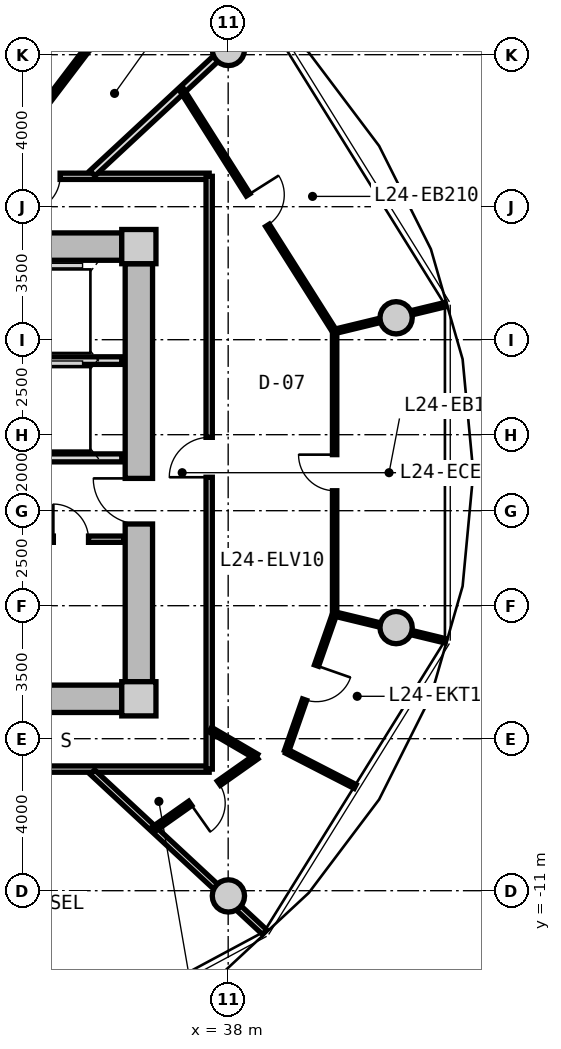
"""IFC4 building model, lengths in metres.
Left out: names, types, materials, properties, quantities, classifications, styles, units other than length and angle.
Written with IfcOpenShell. Run it as: python <this file> out.ifc"""

import sys

from ifc_helpers import new_model, si_unit, direction, frame, frame_2d, origin, origin_2d, place, context, subcontext, project, spatial, rectangle, circle, extrude, source, transform, mapped, element, fill, save


model = new_model("IFC4")
c1 = context("Model", 3, precision=1e-05, world=origin(), true_north=direction((0.0, 1.0)))
c2 = subcontext(c1, "Body", "Model", "MODEL_VIEW")
j1 = project(units=[si_unit("LENGTHUNIT", "METRE"), si_unit("PLANEANGLEUNIT", "RADIAN")], contexts=[c1])
p1 = place(None, origin())
s1 = spatial("IfcSite", under=j1, at=p1, CompositionType="ELEMENT")
p2 = place(p1, origin())
s2 = spatial("IfcBuilding", under=s1, at=p2, CompositionType="ELEMENT")
p3 = place(p2, frame((0.0, 0.0, 81.0)))
s3 = spatial("IfcBuildingStorey", under=s2, at=p3, CompositionType="ELEMENT", Elevation=81.0)
m1 = source(origin(), c2, "Body", "SweptSolid", [
    extrude(rectangle(XDim=0.9, YDim=0.9, at=origin_2d()), origin(), (0.0, 0.0, 1.0), 3.05),
])
for number, where, z_axis, x_axis in (
    (1, (35.65, -5.95, 0.0), (0.0, 0.0, 1.0), (1.0, 0.0, 0.0)),
    (2, (35.65, 5.95, 0.0), (0.0, 0.0, 1.0), (1.0, 0.0, 0.0)),
):
    element("IfcColumn", number, at=place(p3, frame(where, z_axis=z_axis, x_axis=x_axis)), inside=s3, PredefinedType="COLUMN", context=c2, shape_type="MappedRepresentation", body=[
        mapped(m1, transform((0.0, 0.0, 0.0), x_axis=(1.0, 0.0, 0.0), y_axis=(0.0, 1.0, 0.0), z_axis=(0.0, 0.0, 1.0), scale=1.0)),
    ])
m2 = source(origin(), c2, "Body", "SweptSolid", [
    extrude(rectangle(XDim=14.4, YDim=0.72, at=frame_2d((7.2, 0.0))), origin(), (0.0, 0.0, 1.0), 2.79),
])
for number, where, z_axis, x_axis in (
    (3, (20.8, 5.95, 0.0), (0.0, 0.0, 1.0), (1.0, 0.0, 0.0)),
    (4, (35.2, -5.95, 0.0), (0.0, 0.0, 1.0), (-1.0, 0.0, 0.0)),
):
    element("IfcWall", number, at=place(p3, frame(where, z_axis=z_axis, x_axis=x_axis)), inside=s3, PredefinedType="SHEAR", context=c2, shape_type="MappedRepresentation", body=[
        mapped(m2, transform((0.0, 0.0, 0.0), x_axis=(1.0, 0.0, 0.0), y_axis=(0.0, 1.0, 0.0), z_axis=(0.0, 0.0, 1.0), scale=1.0)),
    ])
m3 = source(origin(), c2, "Body", "SweptSolid", [
    extrude(rectangle(XDim=11.0, YDim=0.72, at=frame_2d((5.5, 0.0))), origin(), (0.0, 0.0, 1.0), 2.79),
])
p4 = place(p3, frame((35.65, 5.5, 0.0), z_axis=(0.0, 0.0, 1.0), x_axis=(0.0, -1.0, 0.0)))
e5 = element("IfcWall", 5, at=p4, inside=s3, PredefinedType="SHEAR", context=c2, shape_type="MappedRepresentation", body=[
    mapped(m3, transform((0.0, 0.0, 0.0), x_axis=(1.0, 0.0, 0.0), y_axis=(0.0, 1.0, 0.0), z_axis=(0.0, 0.0, 1.0), scale=1.0)),
])
p5 = place(p4, frame((5.65, 0.0, 0.0)))
e6 = element("IfcOpeningElement", 6, at=p5, cuts=e5, PredefinedType="OPENING", context=c2, shape_type="SweptSolid", body=[
    extrude(rectangle(XDim=1.2, YDim=2.15, at=frame_2d((0.6, 1.075))), frame((0.0, 0.37, 0.0), z_axis=(0.0, -1.0, 0.0), x_axis=(1.0, 0.0, 0.0)), (0.0, 0.0, 1.0), 0.74),
])
m4 = source(origin(), c2, "Body", "SweptSolid", [
    extrude(circle(Radius=0.425, at=origin_2d()), origin(), (0.0, 0.0, 1.0), 3.05),
])
for number, where, z_axis, x_axis in (
    (7, (42.419, 4.076, 0.0), (0.0, 0.0, 1.0), (1.0, 0.0, 0.0)),
    (8, (38.006, 11.137, 0.0), (0.0, 0.0, 1.0), (1.0, 0.0, 0.0)),
    (9, (38.006, -11.137, 0.0), (0.0, 0.0, 1.0), (1.0, 0.0, 0.0)),
    (10, (42.419, -4.076, 0.0), (0.0, 0.0, 1.0), (1.0, 0.0, 0.0)),
):
    element("IfcColumn", number, at=place(p3, frame(where, z_axis=z_axis, x_axis=x_axis)), inside=s3, PredefinedType="COLUMN", context=c2, shape_type="MappedRepresentation", body=[
        mapped(m4, transform((0.0, 0.0, 0.0), x_axis=(1.0, 0.0, 0.0), y_axis=(0.0, 1.0, 0.0), z_axis=(0.0, 0.0, 1.0), scale=1.0)),
    ])
m5 = source(origin(), c2, "Body", "SweptSolid", [
    extrude(rectangle(XDim=3.2, YDim=0.2, at=frame_2d((1.6, 0.0))), origin(), (0.0, 0.0, 1.0), 2.775),
])
p6 = place(p3, frame((32.0, 2.95, 0.0), z_axis=(0.0, 0.0, 1.0), x_axis=(1.0, 0.0, 0.0)))
e11 = element("IfcWall", 11, at=p6, inside=s3, PredefinedType="PARTITIONING", context=c2, shape_type="MappedRepresentation", body=[
    mapped(m5, transform((0.0, 0.0, 0.0), x_axis=(1.0, 0.0, 0.0), y_axis=(0.0, 1.0, 0.0), z_axis=(0.0, 0.0, 1.0), scale=1.0)),
])
m6 = source(origin(), c2, "Body", "SweptSolid", [
    extrude(rectangle(XDim=6.66, YDim=0.21, at=frame_2d((3.33, 0.0))), origin(), (0.0, 0.0, 1.0), 2.775),
])
p7 = place(p3, frame((28.54, 0.39, 0.0), z_axis=(0.0, 0.0, 1.0), x_axis=(1.0, 0.0, 0.0)))
e12 = element("IfcWall", 12, at=p7, inside=s3, PredefinedType="PARTITIONING", context=c2, shape_type="MappedRepresentation", body=[
    mapped(m6, transform((0.0, 0.0, 0.0), x_axis=(1.0, 0.0, 0.0), y_axis=(0.0, 1.0, 0.0), z_axis=(0.0, 0.0, 1.0), scale=1.0)),
])
p8 = place(p7, frame((1.0, 0.0, 0.0)))
e13 = element("IfcOpeningElement", 13, at=p8, cuts=e12, PredefinedType="OPENING", context=c2, shape_type="SweptSolid", body=[
    extrude(rectangle(XDim=1.2, YDim=2.15, at=frame_2d((0.6, 1.075))), frame((0.0, 0.115, 0.0), z_axis=(0.0, -1.0, 0.0), x_axis=(1.0, 0.0, 0.0)), (0.0, 0.0, 1.0), 0.23),
])
m7 = source(origin(), c2, "Body", "SweptSolid", [
    extrude(rectangle(XDim=2.7, YDim=0.165, at=frame_2d((1.35, 0.0))), origin(), (0.0, 0.0, 1.0), 2.775),
])
p9 = place(p3, frame((32.55, -1.75, 0.0), z_axis=(0.0, 0.0, 1.0), x_axis=(1.0, 0.0, 0.0)))
e14 = element("IfcWall", 14, at=p9, inside=s3, PredefinedType="PARTITIONING", context=c2, shape_type="MappedRepresentation", body=[
    mapped(m7, transform((0.0, 0.0, 0.0), x_axis=(1.0, 0.0, 0.0), y_axis=(0.0, 1.0, 0.0), z_axis=(0.0, 0.0, 1.0), scale=1.0)),
])
p10 = place(p9, frame((0.85, 0.0, 0.0)))
e15 = element("IfcOpeningElement", 15, at=p10, cuts=e14, PredefinedType="OPENING", context=c2, shape_type="SweptSolid", body=[
    extrude(rectangle(XDim=0.925, YDim=2.1, at=frame_2d((0.462, 1.05))), frame((0.0, 0.093, 0.0), z_axis=(0.0, -1.0, 0.0), x_axis=(1.0, 0.0, 0.0)), (0.0, 0.0, 1.0), 0.185),
])
m8 = source(origin(), c2, "Body", "SweptSolid", [
    extrude(rectangle(XDim=9.234, YDim=0.165, at=frame_2d((4.617, 0.0))), origin(), (0.0, 0.0, 1.0), 2.775),
])
p11 = place(p3, frame((28.266, 7.8, 0.0), z_axis=(0.0, 0.0, 1.0), x_axis=(1.0, 0.0, 0.0)))
e16 = element("IfcWall", 16, at=p11, inside=s3, PredefinedType="PARTITIONING", context=c2, shape_type="MappedRepresentation", body=[
    mapped(m8, transform((0.0, 0.0, 0.0), x_axis=(1.0, 0.0, 0.0), y_axis=(0.0, 1.0, 0.0), z_axis=(0.0, 0.0, 1.0), scale=1.0)),
])
p12 = place(p11, frame((4.392, 0.0, 0.0)))
e17 = element("IfcOpeningElement", 17, at=p12, cuts=e16, PredefinedType="OPENING", context=c2, shape_type="SweptSolid", body=[
    extrude(rectangle(XDim=0.92, YDim=2.1, at=frame_2d((0.46, 1.05))), frame((0.0, 0.093, 0.0), z_axis=(0.0, -1.0, 0.0), x_axis=(1.0, 0.0, 0.0)), (0.0, 0.0, 1.0), 0.185),
])
p13 = place(p11, frame((1.408, 0.0, 0.0)))
e18 = element("IfcOpeningElement", 18, at=p13, cuts=e16, PredefinedType="OPENING", context=c2, shape_type="SweptSolid", body=[
    extrude(rectangle(XDim=0.92, YDim=2.1, at=frame_2d((0.46, 1.05))), frame((0.0, 0.093, 0.0), z_axis=(0.0, -1.0, 0.0), x_axis=(1.0, 0.0, 0.0)), (0.0, 0.0, 1.0), 0.185),
])
m9 = source(origin(), c2, "Body", "SweptSolid", [
    extrude(rectangle(XDim=8.6, YDim=0.165, at=frame_2d((4.3, 0.0))), origin(), (0.0, 0.0, 1.0), 2.775),
])
p14 = place(p3, frame((37.5, -7.8, 0.0), z_axis=(0.0, 0.0, 1.0), x_axis=(-1.0, 0.0, 0.0)))
e19 = element("IfcWall", 19, at=p14, inside=s3, PredefinedType="PARTITIONING", context=c2, shape_type="MappedRepresentation", body=[
    mapped(m9, transform((0.0, 0.0, 0.0), x_axis=(1.0, 0.0, 0.0), y_axis=(0.0, 1.0, 0.0), z_axis=(0.0, 0.0, 1.0), scale=1.0)),
])
m10 = source(origin(), c2, "Body", "SweptSolid", [
    extrude(rectangle(XDim=15.6, YDim=0.165, at=frame_2d((7.8, 0.0))), origin(), (0.0, 0.0, 1.0), 2.775),
])
p15 = place(p3, frame((37.5, 7.8, 0.0), z_axis=(0.0, 0.0, 1.0), x_axis=(0.0, -1.0, 0.0)))
e20 = element("IfcWall", 20, at=p15, inside=s3, PredefinedType="PARTITIONING", context=c2, shape_type="MappedRepresentation", body=[
    mapped(m10, transform((0.0, 0.0, 0.0), x_axis=(1.0, 0.0, 0.0), y_axis=(0.0, 1.0, 0.0), z_axis=(0.0, 0.0, 1.0), scale=1.0)),
])
p16 = place(p15, frame((6.87, 0.0, 0.0)))
e21 = element("IfcOpeningElement", 21, at=p16, cuts=e20, PredefinedType="OPENING", context=c2, shape_type="SweptSolid", body=[
    extrude(rectangle(XDim=1.05, YDim=2.15, at=frame_2d((0.525, 1.075))), frame((0.0, 0.093, 0.0), z_axis=(0.0, -1.0, 0.0), x_axis=(1.0, 0.0, 0.0)), (0.0, 0.0, 1.0), 0.185),
])
m11 = source(origin(), c2, "Body", "SweptSolid", [
    extrude(rectangle(XDim=6.187, YDim=0.165, at=frame_2d((3.093, 0.0))), origin(), (0.0, 0.0, 1.0), 2.275),
])
p17 = place(p3, frame((34.429, -7.88, 0.0), z_axis=(0.0, 0.0, 1.0), x_axis=(0.732501077882, -0.680765870841, 0.0)))
e22 = element("IfcWall", 22, at=p17, inside=s3, PredefinedType="PARTITIONING", context=c2, shape_type="MappedRepresentation", body=[
    mapped(m11, transform((0.0, 0.0, 0.0), x_axis=(1.0, 0.0, 0.0), y_axis=(0.0, 1.0, 0.0), z_axis=(0.0, 0.0, 1.0), scale=1.0)),
])
m12 = source(origin(), c2, "Body", "SweptSolid", [
    extrude(rectangle(XDim=6.187, YDim=0.19, at=frame_2d((3.093, 0.0))), origin(), (0.0, 0.0, 1.0), 2.275),
])
p18 = place(p3, frame((34.429, 7.88, 0.0), z_axis=(0.0, 0.0, 1.0), x_axis=(0.732501077882, 0.680765870841, 0.0)))
e23 = element("IfcWall", 23, at=p18, inside=s3, PredefinedType="PARTITIONING", context=c2, shape_type="MappedRepresentation", body=[
    mapped(m12, transform((0.0, 0.0, 0.0), x_axis=(1.0, 0.0, 0.0), y_axis=(0.0, 1.0, 0.0), z_axis=(0.0, 0.0, 1.0), scale=1.0)),
])
m13 = source(origin(), c2, "Body", "SweptSolid", [
    extrude(rectangle(XDim=7.438, YDim=0.115, at=frame_2d((3.719, 0.0))), origin(), (0.0, 0.0, 1.0), 2.775),
])
p19 = place(p3, frame((40.801, -3.719, 0.0), z_axis=(0.0, 0.0, 1.0), x_axis=(0.0, 1.0, 0.0)))
e24 = element("IfcWall", 24, at=p19, inside=s3, PredefinedType="PARTITIONING", context=c2, shape_type="MappedRepresentation", body=[
    mapped(m13, transform((0.0, 0.0, 0.0), x_axis=(1.0, 0.0, 0.0), y_axis=(0.0, 1.0, 0.0), z_axis=(0.0, 0.0, 1.0), scale=1.0)),
])
p20 = place(p19, frame((3.244, 0.0, 0.0)))
e25 = element("IfcOpeningElement", 25, at=p20, cuts=e24, PredefinedType="OPENING", context=c2, shape_type="SweptSolid", body=[
    extrude(rectangle(XDim=0.95, YDim=2.1, at=frame_2d((0.475, 1.05))), frame((0.0, 0.067, 0.0), z_axis=(0.0, -1.0, 0.0), x_axis=(1.0, 0.0, 0.0)), (0.0, 0.0, 1.0), 0.135),
])
m14 = source(origin(), c2, "Body", "SweptSolid", [
    extrude(rectangle(XDim=3.006, YDim=0.115, at=frame_2d((1.503, 0.0))), origin(), (0.0, 0.0, 1.0), 2.275),
])
p21 = place(p3, frame((40.801, -3.719, 0.0), z_axis=(0.0, 0.0, 1.0), x_axis=(0.971949193017, -0.235190914353, 0.0)))
e26 = element("IfcWall", 26, at=p21, inside=s3, PredefinedType="PARTITIONING", context=c2, shape_type="MappedRepresentation", body=[
    mapped(m14, transform((0.0, 0.0, 0.0), x_axis=(1.0, 0.0, 0.0), y_axis=(0.0, 1.0, 0.0), z_axis=(0.0, 0.0, 1.0), scale=1.0)),
])
m15 = source(origin(), c2, "Body", "SweptSolid", [
    extrude(rectangle(XDim=7.555, YDim=0.115, at=frame_2d((3.777, 0.0))), origin(), (0.0, 0.0, 1.0), 2.775),
])
p22 = place(p3, frame((40.8, 3.718, 0.0), z_axis=(0.0, 0.0, 1.0), x_axis=(-0.534546095992, 0.845139320621, 0.0)))
e27 = element("IfcWall", 27, at=p22, inside=s3, PredefinedType="PARTITIONING", context=c2, shape_type="MappedRepresentation", body=[
    mapped(m15, transform((0.0, 0.0, 0.0), x_axis=(1.0, 0.0, 0.0), y_axis=(0.0, 1.0, 0.0), z_axis=(0.0, 0.0, 1.0), scale=1.0)),
])
p23 = place(p22, frame((3.302, 0.0, 0.0)))
e28 = element("IfcOpeningElement", 28, at=p23, cuts=e27, PredefinedType="OPENING", context=c2, shape_type="SweptSolid", body=[
    extrude(rectangle(XDim=0.95, YDim=2.1, at=frame_2d((0.475, 1.05))), frame((0.0, 0.067, 0.0), z_axis=(0.0, -1.0, 0.0), x_axis=(1.0, 0.0, 0.0)), (0.0, 0.0, 1.0), 0.135),
])
m16 = source(origin(), c2, "Body", "SweptSolid", [
    extrude(rectangle(XDim=3.008, YDim=0.115, at=frame_2d((1.504, 0.0))), origin(), (0.0, 0.0, 1.0), 2.275),
])
p24 = place(p3, frame((40.8, 3.718, 0.0), z_axis=(0.0, 0.0, 1.0), x_axis=(0.971939021518, 0.235232945078, 0.0)))
e29 = element("IfcWall", 29, at=p24, inside=s3, PredefinedType="PARTITIONING", context=c2, shape_type="MappedRepresentation", body=[
    mapped(m16, transform((0.0, 0.0, 0.0), x_axis=(1.0, 0.0, 0.0), y_axis=(0.0, 1.0, 0.0), z_axis=(0.0, 0.0, 1.0), scale=1.0)),
])
m17 = source(origin(), c2, "Body", "SweptSolid", [
    extrude(rectangle(XDim=1.407, YDim=0.14, at=frame_2d((0.704, 0.0))), origin(), (0.0, 0.0, 1.0), 2.775),
])
p25 = place(p3, frame((37.53, -6.762, 0.0), z_axis=(0.0, 0.0, 1.0), x_axis=(0.863539718977, -0.504280828258, 0.0)))
e30 = element("IfcWall", 30, at=p25, inside=s3, PredefinedType="PARTITIONING", context=c2, shape_type="MappedRepresentation", body=[
    mapped(m17, transform((0.0, 0.0, 0.0), x_axis=(1.0, 0.0, 0.0), y_axis=(0.0, 1.0, 0.0), z_axis=(0.0, 0.0, 1.0), scale=1.0)),
])
m18 = source(origin(), c2, "Body", "SweptSolid", [
    extrude(rectangle(XDim=3.347, YDim=0.14, at=frame_2d((1.673, 0.0))), origin(), (0.0, 0.0, 1.0), 2.775),
])
p26 = place(p3, frame((38.745, -7.472, 0.0), z_axis=(0.0, 0.0, 1.0), x_axis=(-0.81705680263, -0.576557179537, 0.0)))
e31 = element("IfcWall", 31, at=p26, inside=s3, PredefinedType="PARTITIONING", context=c2, shape_type="MappedRepresentation", body=[
    mapped(m18, transform((0.0, 0.0, 0.0), x_axis=(1.0, 0.0, 0.0), y_axis=(0.0, 1.0, 0.0), z_axis=(0.0, 0.0, 1.0), scale=1.0)),
])
p27 = place(p26, frame((1.214, 0.0, 0.0)))
e32 = element("IfcOpeningElement", 32, at=p27, cuts=e31, PredefinedType="OPENING", context=c2, shape_type="SweptSolid", body=[
    extrude(rectangle(XDim=0.92, YDim=2.1, at=frame_2d((0.46, 1.05))), frame((0.0, 0.08, 0.0), z_axis=(0.0, -1.0, 0.0), x_axis=(1.0, 0.0, 0.0)), (0.0, 0.0, 1.0), 0.16),
])
m19 = source(origin(), c2, "Body", "SweptSolid", [
    extrude(rectangle(XDim=2.031, YDim=0.115, at=frame_2d((1.016, 0.0))), origin(), (0.0, 0.0, 1.0), 2.775),
])
p28 = place(p3, frame((39.535, -7.33, 0.0), z_axis=(0.0, 0.0, 1.0), x_axis=(0.889297578836, -0.457329002226, 0.0)))
e33 = element("IfcWall", 33, at=p28, inside=s3, PredefinedType="PARTITIONING", context=c2, shape_type="MappedRepresentation", body=[
    mapped(m19, transform((0.0, 0.0, 0.0), x_axis=(1.0, 0.0, 0.0), y_axis=(0.0, 1.0, 0.0), z_axis=(0.0, 0.0, 1.0), scale=1.0)),
])
m20 = source(origin(), c2, "Body", "SweptSolid", [
    extrude(rectangle(XDim=3.826, YDim=0.115, at=frame_2d((1.913, 0.0))), origin(), (0.0, 0.0, 1.0), 2.775),
])
p29 = place(p3, frame((39.535, -7.33, 0.0), z_axis=(0.0, 0.0, 1.0), x_axis=(0.330452740212, 0.943822539721, 0.0)))
e34 = element("IfcWall", 34, at=p29, inside=s3, PredefinedType="PARTITIONING", context=c2, shape_type="MappedRepresentation", body=[
    mapped(m20, transform((0.0, 0.0, 0.0), x_axis=(1.0, 0.0, 0.0), y_axis=(0.0, 1.0, 0.0), z_axis=(0.0, 0.0, 1.0), scale=1.0)),
])
p30 = place(p29, frame((1.438, 0.0, 0.0)))
e35 = element("IfcOpeningElement", 35, at=p30, cuts=e34, PredefinedType="OPENING", context=c2, shape_type="SweptSolid", body=[
    extrude(rectangle(XDim=0.95, YDim=2.1, at=frame_2d((0.475, 1.05))), frame((0.0, 0.067, 0.0), z_axis=(0.0, -1.0, 0.0), x_axis=(1.0, 0.0, 0.0)), (0.0, 0.0, 1.0), 0.135),
])
m21 = source(origin(), c2, "Body", "SweptSolid", [
    extrude(rectangle(XDim=7.243, YDim=0.14, at=frame_2d((3.621, 0.0))), origin(), (0.0, 0.0, 1.0), 2.775),
])
p31 = place(p3, frame((31.774, 7.83, 0.0), z_axis=(0.0, 0.0, 1.0), x_axis=(0.605111472002, 0.796140757939, 0.0)))
e36 = element("IfcWall", 36, at=p31, inside=s3, PredefinedType="PARTITIONING", context=c2, shape_type="MappedRepresentation", body=[
    mapped(m21, transform((0.0, 0.0, 0.0), x_axis=(1.0, 0.0, 0.0), y_axis=(0.0, 1.0, 0.0), z_axis=(0.0, 0.0, 1.0), scale=1.0)),
])
m22 = source(origin(), c2, "Body", "SweptSolid", [
    extrude(rectangle(XDim=1.2, YDim=2.15, at=frame_2d((0.6, 1.075))), frame((0.0, 0.025, 0.0), z_axis=(0.0, -1.0, 0.0), x_axis=(1.0, 0.0, 0.0)), (0.0, 0.0, 1.0), 0.05),
])
p32 = place(p5, frame((1.2, 0.0, 0.0), z_axis=(0.0, 0.0, 1.0), x_axis=(-1.0, 0.0, 0.0)))
e37 = element("IfcDoor", 37, at=p32, inside=s3, OperationType="SINGLE_SWING_RIGHT", PredefinedType="DOOR", context=c2, shape_type="MappedRepresentation", body=[
    mapped(m22, transform((0.0, 0.0, 0.0), x_axis=(1.0, 0.0, 0.0), y_axis=(0.0, 1.0, 0.0), z_axis=(0.0, 0.0, 1.0), scale=1.0)),
])
fill(e6, e37)
m23 = source(origin(), c2, "Body", "SweptSolid", [
    extrude(rectangle(XDim=0.925, YDim=2.1, at=frame_2d((0.462, 1.05))), frame((0.0, 0.025, 0.0), z_axis=(0.0, -1.0, 0.0), x_axis=(1.0, 0.0, 0.0)), (0.0, 0.0, 1.0), 0.05),
])
p33 = place(p10, origin())
e38 = element("IfcDoor", 38, at=p33, inside=s3, OperationType="SINGLE_SWING_LEFT", PredefinedType="DOOR", context=c2, shape_type="MappedRepresentation", body=[
    mapped(m23, transform((0.0, 0.0, 0.0), x_axis=(1.0, 0.0, 0.0), y_axis=(0.0, 1.0, 0.0), z_axis=(0.0, 0.0, 1.0), scale=1.0)),
])
fill(e15, e38)
m24 = source(origin(), c2, "Body", "SweptSolid", [
    extrude(rectangle(XDim=1.05, YDim=2.15, at=frame_2d((0.525, 1.075))), frame((0.0, 0.025, 0.0), z_axis=(0.0, -1.0, 0.0), x_axis=(1.0, 0.0, 0.0)), (0.0, 0.0, 1.0), 0.05),
])
p34 = place(p16, frame((1.05, 0.0, 0.0), z_axis=(0.0, 0.0, 1.0), x_axis=(-1.0, 0.0, 0.0)))
e39 = element("IfcDoor", 39, at=p34, inside=s3, OperationType="SINGLE_SWING_LEFT", PredefinedType="DOOR", context=c2, shape_type="MappedRepresentation", body=[
    mapped(m24, transform((0.0, 0.0, 0.0), x_axis=(1.0, 0.0, 0.0), y_axis=(0.0, 1.0, 0.0), z_axis=(0.0, 0.0, 1.0), scale=1.0)),
])
fill(e21, e39)
m25 = source(origin(), c2, "Body", "SweptSolid", [
    extrude(rectangle(XDim=0.92, YDim=2.1, at=frame_2d((0.46, 1.05))), frame((0.0, 0.025, 0.0), z_axis=(0.0, -1.0, 0.0), x_axis=(1.0, 0.0, 0.0)), (0.0, 0.0, 1.0), 0.05),
])
p35 = place(p27, origin())
e40 = element("IfcDoor", 40, at=p35, inside=s3, OperationType="SINGLE_SWING_RIGHT", PredefinedType="DOOR", context=c2, shape_type="MappedRepresentation", body=[
    mapped(m25, transform((0.0, 0.0, 0.0), x_axis=(1.0, 0.0, 0.0), y_axis=(0.0, 1.0, 0.0), z_axis=(0.0, 0.0, 1.0), scale=1.0)),
])
fill(e32, e40)
m26 = source(origin(), c2, "Body", "SweptSolid", [
    extrude(rectangle(XDim=0.95, YDim=2.1, at=frame_2d((0.475, 1.05))), frame((0.0, 0.025, 0.0), z_axis=(0.0, -1.0, 0.0), x_axis=(1.0, 0.0, 0.0)), (0.0, 0.0, 1.0), 0.05),
])
p36 = place(p30, frame((0.95, 0.0, 0.0), z_axis=(0.0, 0.0, 1.0), x_axis=(-1.0, 0.0, 0.0)))
e41 = element("IfcDoor", 41, at=p36, inside=s3, OperationType="SINGLE_SWING_LEFT", PredefinedType="DOOR", context=c2, shape_type="MappedRepresentation", body=[
    mapped(m26, transform((0.0, 0.0, 0.0), x_axis=(1.0, 0.0, 0.0), y_axis=(0.0, 1.0, 0.0), z_axis=(0.0, 0.0, 1.0), scale=1.0)),
])
fill(e35, e41)
p37 = place(p20, origin())
e42 = element("IfcDoor", 42, at=p37, inside=s3, OperationType="SINGLE_SWING_RIGHT", PredefinedType="DOOR", context=c2, shape_type="MappedRepresentation", body=[
    mapped(m26, transform((0.0, 0.0, 0.0), x_axis=(1.0, 0.0, 0.0), y_axis=(0.0, 1.0, 0.0), z_axis=(0.0, 0.0, 1.0), scale=1.0)),
])
fill(e25, e42)
p38 = place(p23, frame((0.95, 0.0, 0.0), z_axis=(0.0, 0.0, 1.0), x_axis=(-1.0, 0.0, 0.0)))
e43 = element("IfcDoor", 43, at=p38, inside=s3, OperationType="SINGLE_SWING_LEFT", PredefinedType="DOOR", context=c2, shape_type="MappedRepresentation", body=[
    mapped(m26, transform((0.0, 0.0, 0.0), x_axis=(1.0, 0.0, 0.0), y_axis=(0.0, 1.0, 0.0), z_axis=(0.0, 0.0, 1.0), scale=1.0)),
])
fill(e28, e43)
p39 = place(p12, frame((0.92, 0.0, 0.0), z_axis=(0.0, 0.0, 1.0), x_axis=(-1.0, 0.0, 0.0)))
e44 = element("IfcDoor", 44, at=p39, inside=s3, OperationType="SINGLE_SWING_RIGHT", PredefinedType="DOOR", context=c2, shape_type="MappedRepresentation", body=[
    mapped(m25, transform((0.0, 0.0, 0.0), x_axis=(1.0, 0.0, 0.0), y_axis=(0.0, 1.0, 0.0), z_axis=(0.0, 0.0, 1.0), scale=1.0)),
])
fill(e17, e44)
save(model, sys.argv[1])
